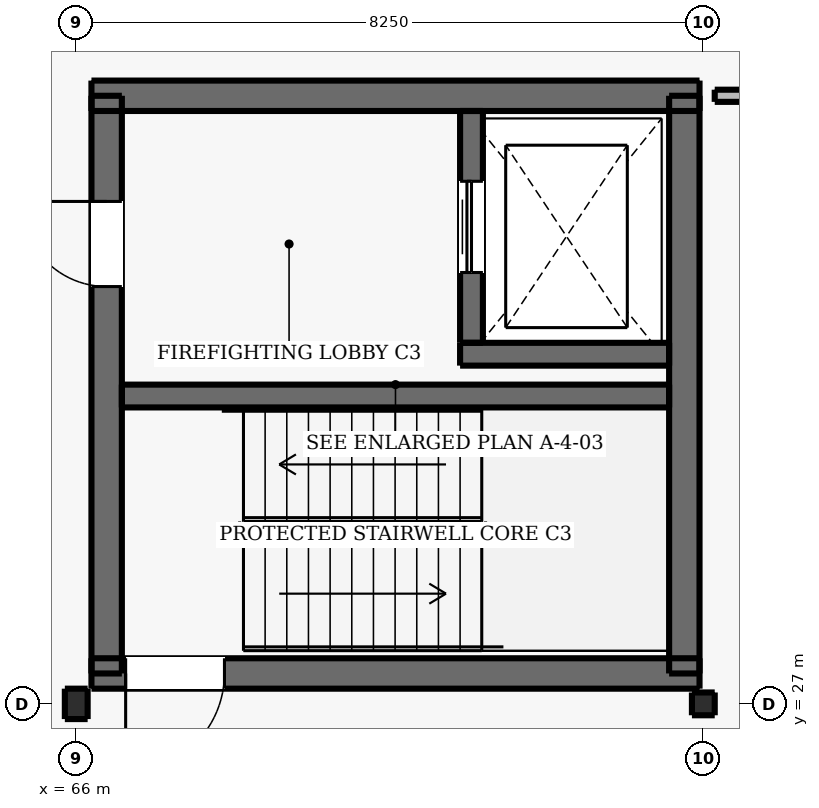
"""IFC4 building model, lengths in metres.
Left out: names, types, materials, properties, quantities, classifications, styles, units other than length and angle.
Written with IfcOpenShell. Run it as: python <this file> out.ifc"""

import sys

from ifc_helpers import new_model, si_unit, direction, frame, frame_2d, origin, origin_2d, place, context, subcontext, project, spatial, rectangle, i_section, extrude, element, fill, save


model = new_model("IFC4")
c1 = context("Model", 3, precision=1e-05, world=origin(), true_north=direction((0.0, 1.0)))
c2 = subcontext(c1, "Body", "Model", "MODEL_VIEW")
j1 = project(units=[si_unit("LENGTHUNIT", "METRE"), si_unit("PLANEANGLEUNIT", "RADIAN")], contexts=[c1])
p1 = place(None, origin())
s1 = spatial("IfcSite", under=j1, at=p1, CompositionType="ELEMENT")
p2 = place(p1, origin())
s2 = spatial("IfcBuilding", under=s1, at=p2, CompositionType="ELEMENT")
p3 = place(p2, frame((0.0, 0.0, 18.0)))
s3 = spatial("IfcBuildingStorey", under=s2, at=p3, CompositionType="ELEMENT", Elevation=18.0)
p4 = place(p3, frame((66.0, 27.0, 0.0), z_axis=(0.0, 0.0, 1.0), x_axis=(1.0, 0.0, 0.0)))
e1 = element("IfcColumn", 1, at=p4, inside=s3, PredefinedType="COLUMN", context=c2, shape_type="SweptSolid", body=[
    extrude(i_section(OverallWidth=0.3, OverallDepth=0.4, WebThickness=0.013, FlangeThickness=0.024, FilletRadius=0.027, at=origin_2d()), origin(), (0.0, 0.0, 1.0), 4.2),
])
p5 = place(p3, frame((74.25, 27.0, 0.0), z_axis=(0.0, 0.0, 1.0), x_axis=(1.0, 0.0, 0.0)))
e2 = element("IfcColumn", 2, at=p5, inside=s3, PredefinedType="COLUMN", context=c2, shape_type="SweptSolid", body=[
    extrude(i_section(OverallWidth=0.3, OverallDepth=0.3, WebThickness=0.011, FlangeThickness=0.019, FilletRadius=0.027, at=origin_2d()), origin(), (0.0, 0.0, 1.0), 4.2),
])
p6 = place(p3, frame((66.2, 27.4, 0.0), z_axis=(0.0, 0.0, 1.0), x_axis=(1.0, 0.0, 0.0)))
e3 = element("IfcWall", 3, at=p6, inside=s3, PredefinedType="SHEAR", context=c2, shape_type="SweptSolid", body=[
    extrude(rectangle(XDim=8.0, YDim=0.4, at=frame_2d((4.0, 0.0))), origin(), (0.0, 0.0, 1.0), 4.2),
])
p7 = place(p6, frame((0.45, 0.0, 0.0)))
e4 = element("IfcOpeningElement", 4, at=p7, cuts=e3, PredefinedType="OPENING", context=c2, shape_type="SweptSolid", body=[
    extrude(rectangle(XDim=1.3, YDim=2.15, at=frame_2d((0.65, 1.075))), frame((0.0, 0.21, 0.0), z_axis=(0.0, -1.0, 0.0), x_axis=(1.0, 0.0, 0.0)), (0.0, 0.0, 1.0), 0.42),
])
p8 = place(p3, frame((66.2, 35.0, 0.0), z_axis=(0.0, 0.0, 1.0), x_axis=(1.0, 0.0, 0.0)))
e5 = element("IfcWall", 5, at=p8, inside=s3, PredefinedType="SHEAR", context=c2, shape_type="SweptSolid", body=[
    extrude(rectangle(XDim=8.0, YDim=0.4, at=frame_2d((4.0, 0.0))), origin(), (0.0, 0.0, 1.0), 4.2),
])
p9 = place(p3, frame((66.4, 27.4, 0.0), z_axis=(0.0, 0.0, 1.0), x_axis=(0.0, 1.0, 0.0)))
e6 = element("IfcWall", 6, at=p9, inside=s3, PredefinedType="SHEAR", context=c2, shape_type="SweptSolid", body=[
    extrude(rectangle(XDim=7.6, YDim=0.4, at=frame_2d((3.8, 0.0))), origin(), (0.0, 0.0, 1.0), 4.2),
])
p10 = place(p9, frame((5.09, 0.0, 0.0)))
e7 = element("IfcOpeningElement", 7, at=p10, cuts=e6, PredefinedType="OPENING", context=c2, shape_type="SweptSolid", body=[
    extrude(rectangle(XDim=1.12, YDim=2.15, at=frame_2d((0.56, 1.075))), frame((0.0, 0.21, 0.0), z_axis=(0.0, -1.0, 0.0), x_axis=(1.0, 0.0, 0.0)), (0.0, 0.0, 1.0), 0.42),
])
p11 = place(p3, frame((74.0, 27.4, 0.0), z_axis=(0.0, 0.0, 1.0), x_axis=(0.0, 1.0, 0.0)))
e8 = element("IfcWall", 8, at=p11, inside=s3, PredefinedType="SHEAR", context=c2, shape_type="SweptSolid", body=[
    extrude(rectangle(XDim=7.6, YDim=0.4, at=frame_2d((3.8, 0.0))), origin(), (0.0, 0.0, 1.0), 4.2),
])
p12 = place(p3, frame((66.6, 31.05, 0.0), z_axis=(0.0, 0.0, 1.0), x_axis=(1.0, 0.0, 0.0)))
e9 = element("IfcWall", 9, at=p12, inside=s3, PredefinedType="SHEAR", context=c2, shape_type="SweptSolid", body=[
    extrude(rectangle(XDim=7.2, YDim=0.3, at=frame_2d((3.6, 0.0))), origin(), (0.0, 0.0, 1.0), 4.2),
])
p13 = place(p3, frame((71.05, 31.6, 0.0), z_axis=(0.0, 0.0, 1.0), x_axis=(1.0, 0.0, 0.0)))
e10 = element("IfcWall", 10, at=p13, inside=s3, PredefinedType="SHEAR", context=c2, shape_type="SweptSolid", body=[
    extrude(rectangle(XDim=2.75, YDim=0.3, at=frame_2d((1.375, 0.0))), origin(), (0.0, 0.0, 1.0), 4.2),
])
p14 = place(p3, frame((71.2, 31.75, 0.0), z_axis=(0.0, 0.0, 1.0), x_axis=(0.0, 1.0, 0.0)))
e11 = element("IfcWall", 11, at=p14, inside=s3, PredefinedType="SHEAR", context=c2, shape_type="SweptSolid", body=[
    extrude(rectangle(XDim=3.05, YDim=0.3, at=frame_2d((1.525, 0.0))), origin(), (0.0, 0.0, 1.0), 4.2),
])
p15 = place(p14, frame((0.925, 0.0, 0.0)))
e12 = element("IfcOpeningElement", 12, at=p15, cuts=e11, PredefinedType="OPENING", context=c2, shape_type="SweptSolid", body=[
    extrude(rectangle(XDim=1.2, YDim=2.15, at=frame_2d((0.6, 1.075))), frame((0.0, 0.16, 0.0), z_axis=(0.0, -1.0, 0.0), x_axis=(1.0, 0.0, 0.0)), (0.0, 0.0, 1.0), 0.32),
])
p16 = place(p3, frame((74.4, 35.0, 0.0), z_axis=(0.0, 0.0, 1.0), x_axis=(1.0, 0.0, 0.0)))
e13 = element("IfcWall", 13, at=p16, inside=s3, PredefinedType="PARTITIONING", context=c2, shape_type="SweptSolid", body=[
    extrude(rectangle(XDim=8.2, YDim=0.16, at=frame_2d((4.1, 0.0))), origin(), (0.0, 0.0, 1.0), 3.92),
])
p17 = place(p16, frame((3.2, 0.0, 0.0)))
e14 = element("IfcOpeningElement", 14, at=p17, cuts=e13, PredefinedType="OPENING", context=c2, shape_type="SweptSolid", body=[
    extrude(rectangle(XDim=1.8, YDim=2.25, at=frame_2d((0.9, 1.125))), frame((0.0, 0.09, 0.0), z_axis=(0.0, -1.0, 0.0), x_axis=(1.0, 0.0, 0.0)), (0.0, 0.0, 1.0), 0.18),
])
p18 = place(p15, origin())
e15 = element("IfcDoor", 15, at=p18, inside=s3, OperationType="DOUBLE_DOOR_SLIDING", PredefinedType="DOOR", context=c2, shape_type="SweptSolid", body=[
    extrude(rectangle(XDim=1.2, YDim=2.15, at=frame_2d((0.6, 1.075))), frame((0.0, 0.025, 0.0), z_axis=(0.0, -1.0, 0.0), x_axis=(1.0, 0.0, 0.0)), (0.0, 0.0, 1.0), 0.05),
])
fill(e12, e15)
p19 = place(p10, origin())
e16 = element("IfcDoor", 16, at=p19, inside=s3, OperationType="SINGLE_SWING_RIGHT", PredefinedType="DOOR", context=c2, shape_type="SweptSolid", body=[
    extrude(rectangle(XDim=1.12, YDim=2.15, at=frame_2d((0.56, 1.075))), frame((0.0, 0.025, 0.0), z_axis=(0.0, -1.0, 0.0), x_axis=(1.0, 0.0, 0.0)), (0.0, 0.0, 1.0), 0.05),
])
fill(e7, e16)
p20 = place(p7, frame((1.3, 0.0, 0.0), z_axis=(0.0, 0.0, 1.0), x_axis=(-1.0, 0.0, 0.0)))
e17 = element("IfcDoor", 17, at=p20, inside=s3, OperationType="SINGLE_SWING_LEFT", PredefinedType="DOOR", context=c2, shape_type="SweptSolid", body=[
    extrude(rectangle(XDim=1.3, YDim=2.15, at=frame_2d((0.65, 1.075))), frame((0.0, 0.025, 0.0), z_axis=(0.0, -1.0, 0.0), x_axis=(1.0, 0.0, 0.0)), (0.0, 0.0, 1.0), 0.05),
])
fill(e4, e17)
save(model, sys.argv[1])
